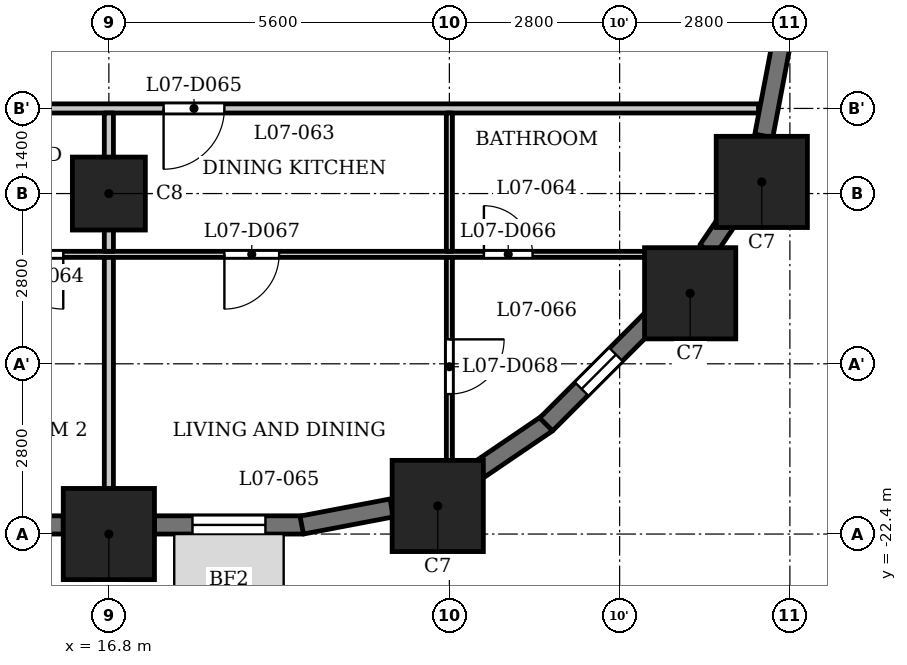
"""IFC4 building model, lengths in metres.
Left out: names, types, materials, properties, quantities, classifications, styles, units other than length and angle.
Written with IfcOpenShell. Run it as: python <this file> out.ifc"""

import sys

from ifc_helpers import new_model, si_unit, direction, frame, frame_2d, origin, origin_2d, place, context, subcontext, project, spatial, rectangle, extrude, element, fill, save


model = new_model("IFC4")
c1 = context("Model", 3, precision=1e-05, world=origin(), true_north=direction((0.0, 1.0)))
c2 = subcontext(c1, "Body", "Model", "MODEL_VIEW")
j1 = project(units=[si_unit("LENGTHUNIT", "METRE"), si_unit("PLANEANGLEUNIT", "RADIAN")], contexts=[c1])
p1 = place(None, origin())
s1 = spatial("IfcSite", under=j1, at=p1, CompositionType="ELEMENT")
p2 = place(p1, origin())
s2 = spatial("IfcBuilding", under=s1, at=p2, CompositionType="ELEMENT")
p3 = place(p2, frame((0.0, 0.0, 34.0)))
s3 = spatial("IfcBuildingStorey", under=s2, at=p3, CompositionType="ELEMENT", Elevation=34.0)
for number, where, z_axis, x_axis in (
    (1, (16.8, -22.4, 0.0), (0.0, 0.0, 1.0), (1.0, 0.0, 0.0)),
    (2, (22.209, -21.938, 0.0), (0.0, 0.0, 1.0), (1.0, 0.0, 0.0)),
    (3, (26.36, -18.44, 0.0), (0.0, 0.0, 1.0), (1.0, 0.0, 0.0)),
    (4, (27.538, -16.609, 0.0), (0.0, 0.0, 1.0), (1.0, 0.0, 0.0)),
):
    element("IfcColumn", number, at=place(p3, frame(where, z_axis=z_axis, x_axis=x_axis)), inside=s3, PredefinedType="COLUMN", context=c2, shape_type="SweptSolid", body=[
        extrude(rectangle(XDim=1.5, YDim=1.5, at=origin_2d()), origin(), (0.0, 0.0, 1.0), 3.5),
    ])
p4 = place(p3, frame((16.8, -16.8, 0.0), z_axis=(0.0, 0.0, 1.0), x_axis=(1.0, 0.0, 0.0)))
e5 = element("IfcColumn", 5, at=p4, inside=s3, PredefinedType="COLUMN", context=c2, shape_type="SweptSolid", body=[
    extrude(rectangle(XDim=1.2, YDim=1.2, at=origin_2d()), origin(), (0.0, 0.0, 1.0), 3.5),
])
p5 = place(p3, frame((11.95, -22.25, 0.0), z_axis=(0.0, 0.0, 1.0), x_axis=(1.0, 0.0, 0.0)))
e6 = element("IfcWall", 6, at=p5, inside=s3, PredefinedType="SOLIDWALL", context=c2, shape_type="SweptSolid", body=[
    extrude(rectangle(XDim=4.1, YDim=0.3, at=frame_2d((2.05, 0.0))), origin(), (0.0, 0.0, 1.0), 2.35),
])
p6 = place(p5, frame((0.387, 0.0, 0.6)))
e7 = element("IfcOpeningElement", 7, at=p6, cuts=e6, PredefinedType="OPENING", context=c2, shape_type="SweptSolid", body=[
    extrude(rectangle(XDim=1.2, YDim=1.55, at=frame_2d((0.6, 0.775))), frame((0.0, 0.16, 0.0), z_axis=(0.0, -1.0, 0.0), x_axis=(1.0, 0.0, 0.0)), (0.0, 0.0, 1.0), 0.32),
])
p7 = place(p5, frame((2.512, 0.0, 0.6)))
e8 = element("IfcOpeningElement", 8, at=p7, cuts=e6, PredefinedType="OPENING", context=c2, shape_type="SweptSolid", body=[
    extrude(rectangle(XDim=1.2, YDim=1.55, at=frame_2d((0.6, 0.775))), frame((0.0, 0.16, 0.0), z_axis=(0.0, -1.0, 0.0), x_axis=(1.0, 0.0, 0.0)), (0.0, 0.0, 1.0), 0.32),
])
p8 = place(p3, frame((17.55, -22.25, 0.0), z_axis=(0.0, 0.0, 1.0), x_axis=(1.0, 0.0, 0.0)))
e9 = element("IfcWall", 9, at=p8, inside=s3, PredefinedType="SOLIDWALL", context=c2, shape_type="SweptSolid", body=[
    extrude(rectangle(XDim=2.45, YDim=0.3, at=frame_2d((1.225, 0.0))), origin(), (0.0, 0.0, 1.0), 2.35),
])
p9 = place(p8, frame((0.625, 0.0, 0.6)))
e10 = element("IfcOpeningElement", 10, at=p9, cuts=e9, PredefinedType="OPENING", context=c2, shape_type="SweptSolid", body=[
    extrude(rectangle(XDim=1.2, YDim=1.55, at=frame_2d((0.6, 0.775))), frame((0.0, 0.16, 0.0), z_axis=(0.0, -1.0, 0.0), x_axis=(1.0, 0.0, 0.0)), (0.0, 0.0, 1.0), 0.32),
])
for number, where, z_axis, x_axis in (
    (11, (19.972, -22.253, 0.0), (0.0, 0.0, 1.0), (0.982, 0.187, 0.0)),
    (12, (22.767, -21.426, 0.0), (0.0, 0.0, 1.0), (0.827, 0.562, 0.0)),
):
    element("IfcWall", number, at=place(p3, frame(where, z_axis=z_axis, x_axis=x_axis)), inside=s3, PredefinedType="SOLIDWALL", context=c2, shape_type="SweptSolid", body=[
        extrude(rectangle(XDim=1.506, YDim=0.3, at=frame_2d((0.753, 0.0))), origin(), (0.0, 0.0, 1.0), 2.35),
    ])
p10 = place(p3, frame((23.991, -20.597, 0.0), z_axis=(0.0, 0.0, 1.0), x_axis=(0.707106781187, 0.707106781187, 0.0)))
e13 = element("IfcWall", 13, at=p10, inside=s3, PredefinedType="SOLIDWALL", context=c2, shape_type="SweptSolid", body=[
    extrude(rectangle(XDim=2.45, YDim=0.3, at=frame_2d((1.225, 0.0))), origin(), (0.0, 0.0, 1.0), 2.35),
])
p11 = place(p10, frame((0.825, 0.0, 0.6)))
e14 = element("IfcOpeningElement", 14, at=p11, cuts=e13, PredefinedType="OPENING", context=c2, shape_type="SweptSolid", body=[
    extrude(rectangle(XDim=0.8, YDim=1.55, at=frame_2d((0.4, 0.775))), frame((0.0, 0.16, 0.0), z_axis=(0.0, -1.0, 0.0), x_axis=(1.0, 0.0, 0.0)), (0.0, 0.0, 1.0), 0.32),
])
p12 = place(p3, frame((26.645, -17.727, 0.0), z_axis=(0.0, 0.0, 1.0), x_axis=(0.562083182981, 0.827080706709, 0.0)))
e15 = element("IfcWall", 15, at=p12, inside=s3, PredefinedType="SOLIDWALL", context=c2, shape_type="SweptSolid", body=[
    extrude(rectangle(XDim=0.677, YDim=0.3, at=frame_2d((0.339, 0.0))), origin(), (0.0, 0.0, 1.0), 3.2),
])
p13 = place(p3, frame((27.571, -15.851, 0.0), z_axis=(0.0, 0.0, 1.0), x_axis=(0.187223837635, 0.982317277982, 0.0)))
e16 = element("IfcWall", 16, at=p13, inside=s3, PredefinedType="SOLIDWALL", context=c2, shape_type="SweptSolid", body=[
    extrude(rectangle(XDim=1.506, YDim=0.3, at=frame_2d((0.753, 0.0))), origin(), (0.0, 0.0, 1.0), 2.35),
])
p14 = place(p3, frame((-26.394, -17.8, 0.0), z_axis=(0.0, 0.0, 1.0), x_axis=(1.0, 0.0, 0.0)))
e17 = element("IfcWall", 17, at=p14, inside=s3, PredefinedType="PARTITIONING", context=c2, shape_type="SweptSolid", body=[
    extrude(rectangle(XDim=53.126, YDim=0.1, at=frame_2d((26.563, 0.0))), origin(), (0.0, 0.0, 1.0), 3.2),
])
p15 = place(p14, frame((0.794, 0.0, 0.0)))
e18 = element("IfcOpeningElement", 18, at=p15, cuts=e17, PredefinedType="OPENING", context=c2, shape_type="SweptSolid", body=[
    extrude(rectangle(XDim=0.8, YDim=2.1, at=frame_2d((0.4, 1.05))), frame((0.0, 0.06, 0.0), z_axis=(0.0, -1.0, 0.0), x_axis=(1.0, 0.0, 0.0)), (0.0, 0.0, 1.0), 0.12),
])
p16 = place(p14, frame((5.644, 0.0, 0.0)))
e19 = element("IfcOpeningElement", 19, at=p16, cuts=e17, PredefinedType="OPENING", context=c2, shape_type="SweptSolid", body=[
    extrude(rectangle(XDim=0.9, YDim=2.1, at=frame_2d((0.45, 1.05))), frame((0.0, 0.06, 0.0), z_axis=(0.0, -1.0, 0.0), x_axis=(1.0, 0.0, 0.0)), (0.0, 0.0, 1.0), 0.12),
])
p17 = place(p14, frame((13.244, 0.0, 0.0)))
e20 = element("IfcOpeningElement", 20, at=p17, cuts=e17, PredefinedType="OPENING", context=c2, shape_type="SweptSolid", body=[
    extrude(rectangle(XDim=0.8, YDim=2.1, at=frame_2d((0.4, 1.05))), frame((0.0, 0.06, 0.0), z_axis=(0.0, -1.0, 0.0), x_axis=(1.0, 0.0, 0.0)), (0.0, 0.0, 1.0), 0.12),
])
p18 = place(p14, frame((11.494, 0.0, 0.0)))
e21 = element("IfcOpeningElement", 21, at=p18, cuts=e17, PredefinedType="OPENING", context=c2, shape_type="SweptSolid", body=[
    extrude(rectangle(XDim=0.9, YDim=2.1, at=frame_2d((0.45, 1.05))), frame((0.0, 0.06, 0.0), z_axis=(0.0, -1.0, 0.0), x_axis=(1.0, 0.0, 0.0)), (0.0, 0.0, 1.0), 0.12),
])
p19 = place(p14, frame((19.344, 0.0, 0.0)))
e22 = element("IfcOpeningElement", 22, at=p19, cuts=e17, PredefinedType="OPENING", context=c2, shape_type="SweptSolid", body=[
    extrude(rectangle(XDim=0.8, YDim=2.1, at=frame_2d((0.4, 1.05))), frame((0.0, 0.06, 0.0), z_axis=(0.0, -1.0, 0.0), x_axis=(1.0, 0.0, 0.0)), (0.0, 0.0, 1.0), 0.12),
])
p20 = place(p14, frame((16.094, 0.0, 0.0)))
e23 = element("IfcOpeningElement", 23, at=p20, cuts=e17, PredefinedType="OPENING", context=c2, shape_type="SweptSolid", body=[
    extrude(rectangle(XDim=0.9, YDim=2.1, at=frame_2d((0.45, 1.05))), frame((0.0, 0.06, 0.0), z_axis=(0.0, -1.0, 0.0), x_axis=(1.0, 0.0, 0.0)), (0.0, 0.0, 1.0), 0.12),
])
p21 = place(p14, frame((24.944, 0.0, 0.0)))
e24 = element("IfcOpeningElement", 24, at=p21, cuts=e17, PredefinedType="OPENING", context=c2, shape_type="SweptSolid", body=[
    extrude(rectangle(XDim=0.8, YDim=2.1, at=frame_2d((0.4, 1.05))), frame((0.0, 0.06, 0.0), z_axis=(0.0, -1.0, 0.0), x_axis=(1.0, 0.0, 0.0)), (0.0, 0.0, 1.0), 0.12),
])
p22 = place(p14, frame((22.444, 0.0, 0.0)))
e25 = element("IfcOpeningElement", 25, at=p22, cuts=e17, PredefinedType="OPENING", context=c2, shape_type="SweptSolid", body=[
    extrude(rectangle(XDim=0.9, YDim=2.1, at=frame_2d((0.45, 1.05))), frame((0.0, 0.06, 0.0), z_axis=(0.0, -1.0, 0.0), x_axis=(1.0, 0.0, 0.0)), (0.0, 0.0, 1.0), 0.12),
])
p23 = place(p14, frame((30.294, 0.0, 0.0)))
e26 = element("IfcOpeningElement", 26, at=p23, cuts=e17, PredefinedType="OPENING", context=c2, shape_type="SweptSolid", body=[
    extrude(rectangle(XDim=0.8, YDim=2.1, at=frame_2d((0.4, 1.05))), frame((0.0, 0.06, 0.0), z_axis=(0.0, -1.0, 0.0), x_axis=(1.0, 0.0, 0.0)), (0.0, 0.0, 1.0), 0.12),
])
p24 = place(p14, frame((26.794, 0.0, 0.0)))
e27 = element("IfcOpeningElement", 27, at=p24, cuts=e17, PredefinedType="OPENING", context=c2, shape_type="SweptSolid", body=[
    extrude(rectangle(XDim=0.9, YDim=2.1, at=frame_2d((0.45, 1.05))), frame((0.0, 0.06, 0.0), z_axis=(0.0, -1.0, 0.0), x_axis=(1.0, 0.0, 0.0)), (0.0, 0.0, 1.0), 0.12),
])
p25 = place(p14, frame((32.744, 0.0, 0.0)))
e28 = element("IfcOpeningElement", 28, at=p25, cuts=e17, PredefinedType="OPENING", context=c2, shape_type="SweptSolid", body=[
    extrude(rectangle(XDim=0.8, YDim=2.1, at=frame_2d((0.4, 1.05))), frame((0.0, 0.06, 0.0), z_axis=(0.0, -1.0, 0.0), x_axis=(1.0, 0.0, 0.0)), (0.0, 0.0, 1.0), 0.12),
])
p26 = place(p14, frame((35.594, 0.0, 0.0)))
e29 = element("IfcOpeningElement", 29, at=p26, cuts=e17, PredefinedType="OPENING", context=c2, shape_type="SweptSolid", body=[
    extrude(rectangle(XDim=0.9, YDim=2.1, at=frame_2d((0.45, 1.05))), frame((0.0, 0.06, 0.0), z_axis=(0.0, -1.0, 0.0), x_axis=(1.0, 0.0, 0.0)), (0.0, 0.0, 1.0), 0.12),
])
p27 = place(p14, frame((39.244, 0.0, 0.0)))
e30 = element("IfcOpeningElement", 30, at=p27, cuts=e17, PredefinedType="OPENING", context=c2, shape_type="SweptSolid", body=[
    extrude(rectangle(XDim=0.9, YDim=2.1, at=frame_2d((0.45, 1.05))), frame((0.0, 0.06, 0.0), z_axis=(0.0, -1.0, 0.0), x_axis=(1.0, 0.0, 0.0)), (0.0, 0.0, 1.0), 0.12),
])
p28 = place(p14, frame((41.544, 0.0, 0.0)))
e31 = element("IfcOpeningElement", 31, at=p28, cuts=e17, PredefinedType="OPENING", context=c2, shape_type="SweptSolid", body=[
    extrude(rectangle(XDim=0.9, YDim=2.1, at=frame_2d((0.45, 1.05))), frame((0.0, 0.06, 0.0), z_axis=(0.0, -1.0, 0.0), x_axis=(1.0, 0.0, 0.0)), (0.0, 0.0, 1.0), 0.12),
])
p29 = place(p14, frame((49.362, 0.0, 0.0)))
e32 = element("IfcOpeningElement", 32, at=p29, cuts=e17, PredefinedType="OPENING", context=c2, shape_type="SweptSolid", body=[
    extrude(rectangle(XDim=0.8, YDim=2.1, at=frame_2d((0.4, 1.05))), frame((0.0, 0.06, 0.0), z_axis=(0.0, -1.0, 0.0), x_axis=(1.0, 0.0, 0.0)), (0.0, 0.0, 1.0), 0.12),
])
p30 = place(p14, frame((45.094, 0.0, 0.0)))
e33 = element("IfcOpeningElement", 33, at=p30, cuts=e17, PredefinedType="OPENING", context=c2, shape_type="SweptSolid", body=[
    extrude(rectangle(XDim=0.9, YDim=2.1, at=frame_2d((0.45, 1.05))), frame((0.0, 0.06, 0.0), z_axis=(0.0, -1.0, 0.0), x_axis=(1.0, 0.0, 0.0)), (0.0, 0.0, 1.0), 0.12),
])
p31 = place(p3, frame((-27.484, -15.4, 0.0), z_axis=(0.0, 0.0, 1.0), x_axis=(1.0, 0.0, 0.0)))
e34 = element("IfcWall", 34, at=p31, inside=s3, PredefinedType="PARTITIONING", context=c2, shape_type="SweptSolid", body=[
    extrude(rectangle(XDim=54.968, YDim=0.15, at=frame_2d((27.484, 0.0))), origin(), (0.0, 0.0, 1.0), 3.2),
])
p32 = place(p31, frame((5.734, 0.0, 0.0)))
e35 = element("IfcOpeningElement", 35, at=p32, cuts=e34, PredefinedType="OPENING", context=c2, shape_type="SweptSolid", body=[
    extrude(rectangle(XDim=1.0, YDim=2.1, at=frame_2d((0.5, 1.05))), frame((0.0, 0.085, 0.0), z_axis=(0.0, -1.0, 0.0), x_axis=(1.0, 0.0, 0.0)), (0.0, 0.0, 1.0), 0.17),
])
p33 = place(p31, frame((11.584, 0.0, 0.0)))
e36 = element("IfcOpeningElement", 36, at=p33, cuts=e34, PredefinedType="OPENING", context=c2, shape_type="SweptSolid", body=[
    extrude(rectangle(XDim=1.0, YDim=2.1, at=frame_2d((0.5, 1.05))), frame((0.0, 0.085, 0.0), z_axis=(0.0, -1.0, 0.0), x_axis=(1.0, 0.0, 0.0)), (0.0, 0.0, 1.0), 0.17),
])
p34 = place(p31, frame((17.184, 0.0, 0.0)))
e37 = element("IfcOpeningElement", 37, at=p34, cuts=e34, PredefinedType="OPENING", context=c2, shape_type="SweptSolid", body=[
    extrude(rectangle(XDim=1.0, YDim=2.1, at=frame_2d((0.5, 1.05))), frame((0.0, 0.085, 0.0), z_axis=(0.0, -1.0, 0.0), x_axis=(1.0, 0.0, 0.0)), (0.0, 0.0, 1.0), 0.17),
])
p35 = place(p31, frame((22.534, 0.0, 0.0)))
e38 = element("IfcOpeningElement", 38, at=p35, cuts=e34, PredefinedType="OPENING", context=c2, shape_type="SweptSolid", body=[
    extrude(rectangle(XDim=1.0, YDim=2.1, at=frame_2d((0.5, 1.05))), frame((0.0, 0.085, 0.0), z_axis=(0.0, -1.0, 0.0), x_axis=(1.0, 0.0, 0.0)), (0.0, 0.0, 1.0), 0.17),
])
p36 = place(p31, frame((28.884, 0.0, 0.0)))
e39 = element("IfcOpeningElement", 39, at=p36, cuts=e34, PredefinedType="OPENING", context=c2, shape_type="SweptSolid", body=[
    extrude(rectangle(XDim=1.0, YDim=2.1, at=frame_2d((0.5, 1.05))), frame((0.0, 0.085, 0.0), z_axis=(0.0, -1.0, 0.0), x_axis=(1.0, 0.0, 0.0)), (0.0, 0.0, 1.0), 0.17),
])
p37 = place(p31, frame((39.334, 0.0, 0.0)))
e40 = element("IfcOpeningElement", 40, at=p37, cuts=e34, PredefinedType="OPENING", context=c2, shape_type="SweptSolid", body=[
    extrude(rectangle(XDim=1.0, YDim=2.1, at=frame_2d((0.5, 1.05))), frame((0.0, 0.085, 0.0), z_axis=(0.0, -1.0, 0.0), x_axis=(1.0, 0.0, 0.0)), (0.0, 0.0, 1.0), 0.17),
])
p38 = place(p31, frame((45.184, 0.0, 0.0)))
e41 = element("IfcOpeningElement", 41, at=p38, cuts=e34, PredefinedType="OPENING", context=c2, shape_type="SweptSolid", body=[
    extrude(rectangle(XDim=1.0, YDim=2.1, at=frame_2d((0.5, 1.05))), frame((0.0, 0.085, 0.0), z_axis=(0.0, -1.0, 0.0), x_axis=(1.0, 0.0, 0.0)), (0.0, 0.0, 1.0), 0.17),
])
p39 = place(p3, frame((16.8, -23.13, 0.0), z_axis=(0.0, 0.0, 1.0), x_axis=(0.0, 1.0, 0.0)))
e42 = element("IfcWall", 42, at=p39, inside=s3, PredefinedType="PARTITIONING", context=c2, shape_type="SweptSolid", body=[
    extrude(rectangle(XDim=5.28, YDim=0.15, at=frame_2d((2.64, 0.0))), origin(), (0.0, 0.0, 1.0), 3.2),
])
p40 = place(p3, frame((16.8, -17.75, 0.0), z_axis=(0.0, 0.0, 1.0), x_axis=(0.0, 1.0, 0.0)))
e43 = element("IfcWall", 43, at=p40, inside=s3, PredefinedType="PARTITIONING", context=c2, shape_type="SweptSolid", body=[
    extrude(rectangle(XDim=2.275, YDim=0.15, at=frame_2d((1.137, 0.0))), origin(), (0.0, 0.0, 1.0), 3.2),
])
p41 = place(p3, frame((22.4, -21.72, 0.0), z_axis=(0.0, 0.0, 1.0), x_axis=(0.0, 1.0, 0.0)))
e44 = element("IfcWall", 44, at=p41, inside=s3, PredefinedType="PARTITIONING", context=c2, shape_type="SweptSolid", body=[
    extrude(rectangle(XDim=3.87, YDim=0.1, at=frame_2d((1.935, 0.0))), origin(), (0.0, 0.0, 1.0), 3.2),
])
p42 = place(p41, frame((1.622, 0.0, 0.0)))
e45 = element("IfcOpeningElement", 45, at=p42, cuts=e44, PredefinedType="OPENING", context=c2, shape_type="SweptSolid", body=[
    extrude(rectangle(XDim=0.9, YDim=2.1, at=frame_2d((0.45, 1.05))), frame((0.0, 0.06, 0.0), z_axis=(0.0, -1.0, 0.0), x_axis=(1.0, 0.0, 0.0)), (0.0, 0.0, 1.0), 0.12),
])
p43 = place(p3, frame((22.4, -17.75, 0.0), z_axis=(0.0, 0.0, 1.0), x_axis=(0.0, 1.0, 0.0)))
e46 = element("IfcWall", 46, at=p43, inside=s3, PredefinedType="PARTITIONING", context=c2, shape_type="SweptSolid", body=[
    extrude(rectangle(XDim=2.275, YDim=0.1, at=frame_2d((1.137, 0.0))), origin(), (0.0, 0.0, 1.0), 3.2),
])
p44 = place(p28, origin())
e47 = element("IfcDoor", 47, at=p44, inside=s3, OperationType="SINGLE_SWING_RIGHT", PredefinedType="DOOR", context=c2, shape_type="SweptSolid", body=[
    extrude(rectangle(XDim=0.9, YDim=2.1, at=frame_2d((0.45, 1.05))), frame((0.0, 0.025, 0.0), z_axis=(0.0, -1.0, 0.0), x_axis=(1.0, 0.0, 0.0)), (0.0, 0.0, 1.0), 0.05),
])
fill(e31, e47)
p45 = place(p38, origin())
e48 = element("IfcDoor", 48, at=p45, inside=s3, OperationType="SINGLE_SWING_LEFT", PredefinedType="DOOR", context=c2, shape_type="SweptSolid", body=[
    extrude(rectangle(XDim=1.0, YDim=2.1, at=frame_2d((0.5, 1.05))), frame((0.0, 0.025, 0.0), z_axis=(0.0, -1.0, 0.0), x_axis=(1.0, 0.0, 0.0)), (0.0, 0.0, 1.0), 0.05),
])
fill(e41, e48)
p46 = place(p29, origin())
e49 = element("IfcDoor", 49, at=p46, inside=s3, OperationType="SINGLE_SWING_RIGHT", PredefinedType="DOOR", context=c2, shape_type="SweptSolid", body=[
    extrude(rectangle(XDim=0.8, YDim=2.1, at=frame_2d((0.4, 1.05))), frame((0.0, 0.025, 0.0), z_axis=(0.0, -1.0, 0.0), x_axis=(1.0, 0.0, 0.0)), (0.0, 0.0, 1.0), 0.05),
])
fill(e32, e49)
p47 = place(p30, origin())
e50 = element("IfcDoor", 50, at=p47, inside=s3, OperationType="SINGLE_SWING_LEFT", PredefinedType="DOOR", context=c2, shape_type="SweptSolid", body=[
    extrude(rectangle(XDim=0.9, YDim=2.1, at=frame_2d((0.45, 1.05))), frame((0.0, 0.025, 0.0), z_axis=(0.0, -1.0, 0.0), x_axis=(1.0, 0.0, 0.0)), (0.0, 0.0, 1.0), 0.05),
])
fill(e33, e50)
p48 = place(p42, origin())
e51 = element("IfcDoor", 51, at=p48, inside=s3, OperationType="SINGLE_SWING_RIGHT", PredefinedType="DOOR", context=c2, shape_type="SweptSolid", body=[
    extrude(rectangle(XDim=0.9, YDim=2.1, at=frame_2d((0.45, 1.05))), frame((0.0, 0.025, 0.0), z_axis=(0.0, -1.0, 0.0), x_axis=(1.0, 0.0, 0.0)), (0.0, 0.0, 1.0), 0.05),
])
fill(e45, e51)
p49 = place(p9, origin())
e52 = element("IfcWindow", 52, at=p49, inside=s3, PartitioningType="SINGLE_PANEL", PredefinedType="WINDOW", context=c2, shape_type="SweptSolid", body=[
    extrude(rectangle(XDim=1.2, YDim=1.55, at=frame_2d((0.6, 0.775))), frame((0.0, 0.03, 0.0), z_axis=(0.0, -1.0, 0.0), x_axis=(1.0, 0.0, 0.0)), (0.0, 0.0, 1.0), 0.06),
])
fill(e10, e52)
p50 = place(p11, origin())
e53 = element("IfcWindow", 53, at=p50, inside=s3, PartitioningType="SINGLE_PANEL", PredefinedType="WINDOW", context=c2, shape_type="SweptSolid", body=[
    extrude(rectangle(XDim=0.8, YDim=1.55, at=frame_2d((0.4, 0.775))), frame((0.0, 0.03, 0.0), z_axis=(0.0, -1.0, 0.0), x_axis=(1.0, 0.0, 0.0)), (0.0, 0.0, 1.0), 0.06),
])
fill(e14, e53)
save(model, sys.argv[1])
